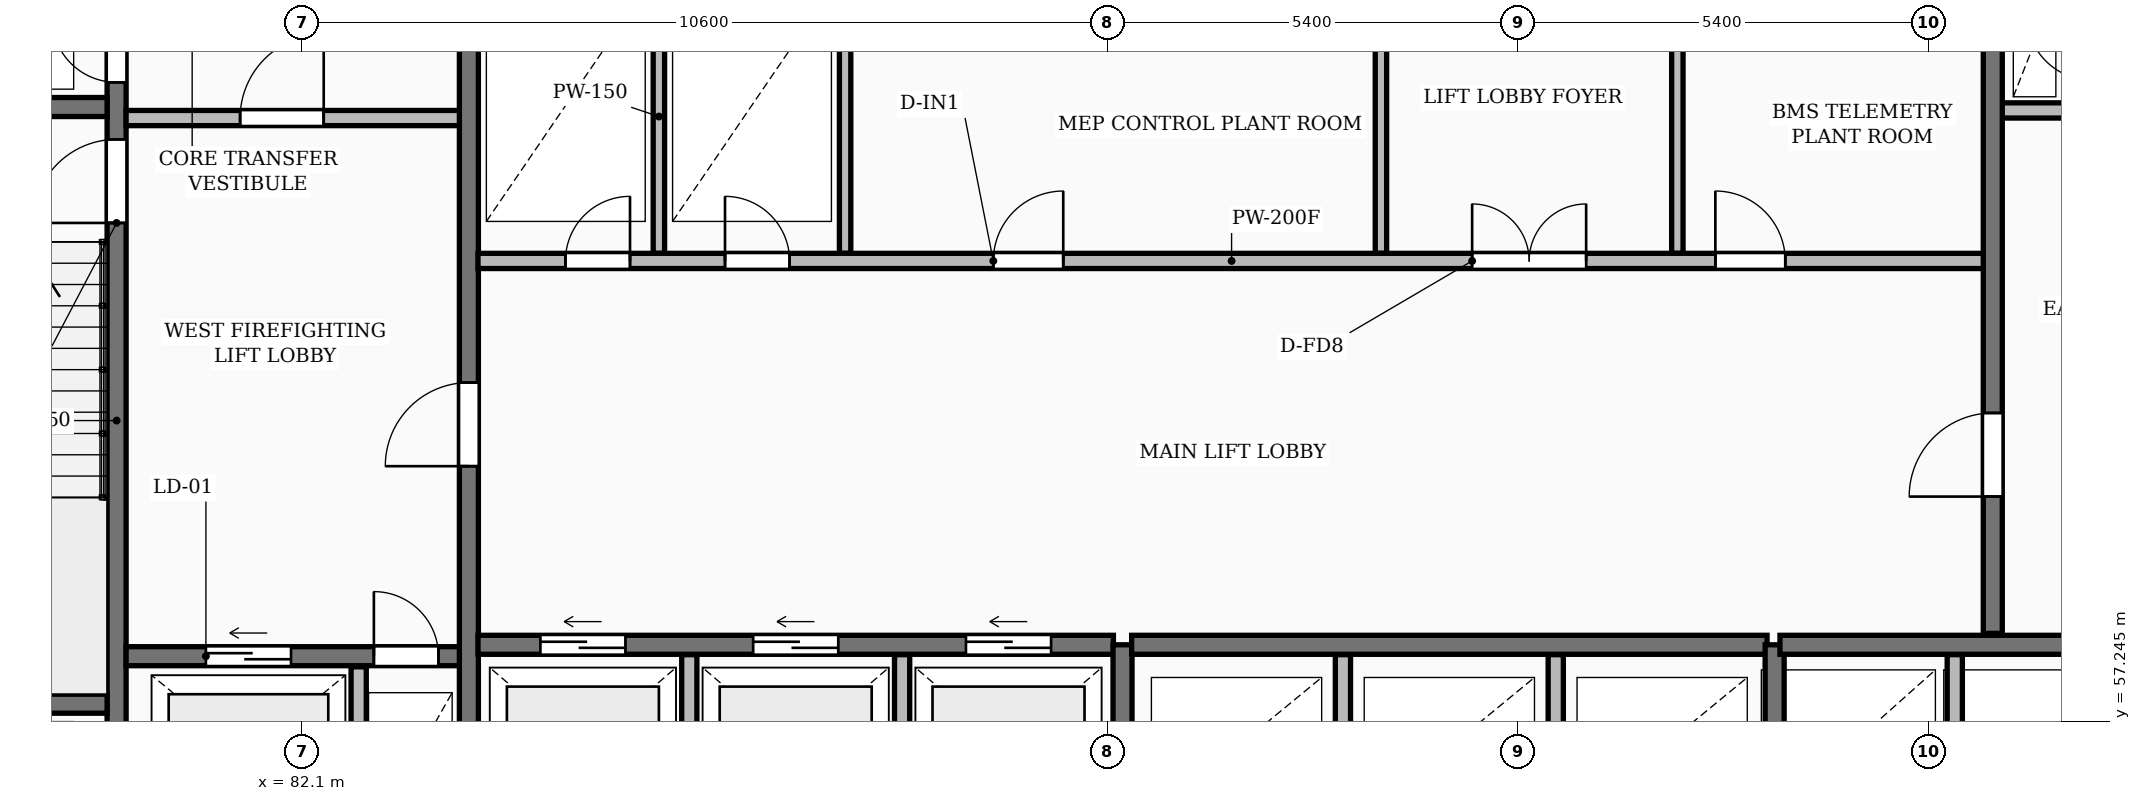
"""IFC4 building model, lengths in metres.
Left out: names, types, materials, properties, quantities, classifications, styles, units other than length and angle.
Written with IfcOpenShell. Run it as: python <this file> out.ifc"""

import sys

from ifc_helpers import new_model, si_unit, direction, frame, frame_2d, origin, place, context, subcontext, project, spatial, rectangle, extrude, element, fill, save


model = new_model("IFC4")
c1 = context("Model", 3, precision=1e-05, world=origin(), true_north=direction((0.0, 1.0)))
c2 = subcontext(c1, "Body", "Model", "MODEL_VIEW")
j1 = project(units=[si_unit("LENGTHUNIT", "METRE"), si_unit("PLANEANGLEUNIT", "RADIAN")], contexts=[c1])
p1 = place(None, origin())
s1 = spatial("IfcSite", under=j1, at=p1, CompositionType="ELEMENT")
p2 = place(p1, origin())
s2 = spatial("IfcBuilding", under=s1, at=p2, CompositionType="ELEMENT")
p3 = place(p2, frame((0.0, 0.0, 76.0)))
s3 = spatial("IfcBuildingStorey", under=s2, at=p3, CompositionType="ELEMENT", Elevation=76.0)
p4 = place(p3, frame((79.665, 55.4, 0.0), z_axis=(0.0, 0.0, 1.0), x_axis=(0.0, 1.0, 0.0)))
e1 = element("IfcWall", 1, at=p4, inside=s3, PredefinedType="SHEAR", context=c2, shape_type="SweptSolid", body=[
    extrude(rectangle(XDim=11.6, YDim=0.25, at=frame_2d((5.8, 0.0))), origin(), (0.0, 0.0, 1.0), 4.8),
])
p5 = place(p4, frame((0.55, 0.0, 0.0)))
e2 = element("IfcOpeningElement", 2, at=p5, cuts=e1, PredefinedType="OPENING", context=c2, shape_type="SweptSolid", body=[
    extrude(rectangle(XDim=0.85, YDim=2.05, at=frame_2d((0.425, 1.025))), frame((0.0, 0.135, 0.0), z_axis=(0.0, -1.0, 0.0), x_axis=(1.0, 0.0, 0.0)), (0.0, 0.0, 1.0), 0.27),
])
p6 = place(p4, frame((8.4, 0.0, 0.0)))
e3 = element("IfcOpeningElement", 3, at=p6, cuts=e1, PredefinedType="OPENING", context=c2, shape_type="SweptSolid", body=[
    extrude(rectangle(XDim=1.1, YDim=2.1, at=frame_2d((0.55, 1.05))), frame((0.0, 0.135, 0.0), z_axis=(0.0, -1.0, 0.0), x_axis=(1.0, 0.0, 0.0)), (0.0, 0.0, 1.0), 0.27),
])
p7 = place(p4, frame((10.25, 0.0, 0.0)))
e4 = element("IfcOpeningElement", 4, at=p7, cuts=e1, PredefinedType="OPENING", context=c2, shape_type="SweptSolid", body=[
    extrude(rectangle(XDim=0.85, YDim=2.05, at=frame_2d((0.425, 1.025))), frame((0.0, 0.135, 0.0), z_axis=(0.0, -1.0, 0.0), x_axis=(1.0, 0.0, 0.0)), (0.0, 0.0, 1.0), 0.27),
])
for number, where, z_axis, x_axis in (
    (5, (76.3, 57.475, 0.0), (0.0, 0.0, 1.0), (1.0, 0.0, 0.0)),
    (6, (76.3, 65.325, 0.0), (0.0, 0.0, 1.0), (1.0, 0.0, 0.0)),
):
    element("IfcWall", number, at=place(p3, frame(where, z_axis=z_axis, x_axis=x_axis)), inside=s3, PredefinedType="SHEAR", context=c2, shape_type="SweptSolid", body=[
        extrude(rectangle(XDim=3.24, YDim=0.25, at=frame_2d((1.62, 0.0))), origin(), (0.0, 0.0, 1.0), 4.8),
    ])
p8 = place(p3, frame((79.79, 58.1, 0.0), z_axis=(0.0, 0.0, 1.0), x_axis=(1.0, 0.0, 0.0)))
e7 = element("IfcWall", 7, at=p8, inside=s3, PredefinedType="SHEAR", context=c2, shape_type="SweptSolid", body=[
    extrude(rectangle(XDim=4.39, YDim=0.25, at=frame_2d((2.195, 0.0))), origin(), (0.0, 0.0, 1.0), 4.8),
])
p9 = place(p8, frame((1.05, 0.0, 0.0)))
e8 = element("IfcOpeningElement", 8, at=p9, cuts=e7, PredefinedType="OPENING", context=c2, shape_type="SweptSolid", body=[
    extrude(rectangle(XDim=1.12, YDim=2.12, at=frame_2d((0.56, 1.06))), frame((0.0, 0.135, 0.0), z_axis=(0.0, -1.0, 0.0), x_axis=(1.0, 0.0, 0.0)), (0.0, 0.0, 1.0), 0.27),
])
p10 = place(p8, frame((3.26, 0.0, 0.0)))
e9 = element("IfcOpeningElement", 9, at=p10, cuts=e7, PredefinedType="OPENING", context=c2, shape_type="SweptSolid", body=[
    extrude(rectangle(XDim=0.85, YDim=2.05, at=frame_2d((0.425, 1.025))), frame((0.0, 0.135, 0.0), z_axis=(0.0, -1.0, 0.0), x_axis=(1.0, 0.0, 0.0)), (0.0, 0.0, 1.0), 0.27),
])
p11 = place(p3, frame((82.85, 55.4, 0.0), z_axis=(0.0, 0.0, 1.0), x_axis=(0.0, 1.0, 0.0)))
e10 = element("IfcWall", 10, at=p11, inside=s3, PredefinedType="PARTITIONING", context=c2, shape_type="SweptSolid", body=[
    extrude(rectangle(XDim=2.56, YDim=0.2, at=frame_2d((1.28, 0.0))), origin(), (0.0, 0.0, 1.0), 4.48),
])
p12 = place(p3, frame((79.79, 65.18, 0.0), z_axis=(0.0, 0.0, 1.0), x_axis=(1.0, 0.0, 0.0)))
e11 = element("IfcWall", 11, at=p12, inside=s3, PredefinedType="PARTITIONING", context=c2, shape_type="SweptSolid", body=[
    extrude(rectangle(XDim=4.39, YDim=0.2, at=frame_2d((2.195, 0.0))), origin(), (0.0, 0.0, 1.0), 4.48),
])
p13 = place(p12, frame((1.5, 0.0, 0.0)))
e12 = element("IfcOpeningElement", 12, at=p13, cuts=e11, PredefinedType="OPENING", context=c2, shape_type="SweptSolid", body=[
    extrude(rectangle(XDim=1.1, YDim=2.1, at=frame_2d((0.55, 1.05))), frame((0.0, 0.11, 0.0), z_axis=(0.0, -1.0, 0.0), x_axis=(1.0, 0.0, 0.0)), (0.0, 0.0, 1.0), 0.22),
])
p14 = place(p3, frame((84.3, 55.4, 0.0), z_axis=(0.0, 0.0, 1.0), x_axis=(0.0, 1.0, 0.0)))
e13 = element("IfcWall", 13, at=p14, inside=s3, PredefinedType="SHEAR", context=c2, shape_type="SweptSolid", body=[
    extrude(rectangle(XDim=11.6, YDim=0.25, at=frame_2d((5.8, 0.0))), origin(), (0.0, 0.0, 1.0), 4.8),
])
p15 = place(p14, frame((5.2, 0.0, 0.0)))
e14 = element("IfcOpeningElement", 14, at=p15, cuts=e13, PredefinedType="OPENING", context=c2, shape_type="SweptSolid", body=[
    extrude(rectangle(XDim=1.1, YDim=2.1, at=frame_2d((0.55, 1.05))), frame((0.0, 0.135, 0.0), z_axis=(0.0, -1.0, 0.0), x_axis=(1.0, 0.0, 0.0)), (0.0, 0.0, 1.0), 0.27),
])
for number, where, z_axis, x_axis in (
    (15, (87.2, 55.4, 0.0), (0.0, 0.0, 1.0), (0.0, 1.0, 0.0)),
    (16, (90.0, 55.4, 0.0), (0.0, 0.0, 1.0), (0.0, 1.0, 0.0)),
):
    element("IfcWall", number, at=place(p3, frame(where, z_axis=z_axis, x_axis=x_axis)), inside=s3, PredefinedType="PARTITIONING", context=c2, shape_type="SweptSolid", body=[
        extrude(rectangle(XDim=2.72, YDim=0.2, at=frame_2d((1.36, 0.0))), origin(), (0.0, 0.0, 1.0), 4.48),
    ])
p16 = place(p3, frame((84.42, 58.25, 0.0), z_axis=(0.0, 0.0, 1.0), x_axis=(1.0, 0.0, 0.0)))
e17 = element("IfcWall", 17, at=p16, inside=s3, PredefinedType="SHEAR", context=c2, shape_type="SweptSolid", body=[
    extrude(rectangle(XDim=8.36, YDim=0.25, at=frame_2d((4.18, 0.0))), origin(), (0.0, 0.0, 1.0), 4.8),
])
p17 = place(p16, frame((0.82, 0.0, 0.0)))
e18 = element("IfcOpeningElement", 18, at=p17, cuts=e17, PredefinedType="OPENING", context=c2, shape_type="SweptSolid", body=[
    extrude(rectangle(XDim=1.12, YDim=2.12, at=frame_2d((0.56, 1.06))), frame((0.0, 0.135, 0.0), z_axis=(0.0, -1.0, 0.0), x_axis=(1.0, 0.0, 0.0)), (0.0, 0.0, 1.0), 0.27),
])
p18 = place(p16, frame((3.62, 0.0, 0.0)))
e19 = element("IfcOpeningElement", 19, at=p18, cuts=e17, PredefinedType="OPENING", context=c2, shape_type="SweptSolid", body=[
    extrude(rectangle(XDim=1.12, YDim=2.12, at=frame_2d((0.56, 1.06))), frame((0.0, 0.135, 0.0), z_axis=(0.0, -1.0, 0.0), x_axis=(1.0, 0.0, 0.0)), (0.0, 0.0, 1.0), 0.27),
])
p19 = place(p16, frame((6.42, 0.0, 0.0)))
e20 = element("IfcOpeningElement", 20, at=p19, cuts=e17, PredefinedType="OPENING", context=c2, shape_type="SweptSolid", body=[
    extrude(rectangle(XDim=1.12, YDim=2.12, at=frame_2d((0.56, 1.06))), frame((0.0, 0.135, 0.0), z_axis=(0.0, -1.0, 0.0), x_axis=(1.0, 0.0, 0.0)), (0.0, 0.0, 1.0), 0.27),
])
p20 = place(p3, frame((92.9, 55.4, 0.0), z_axis=(0.0, 0.0, 1.0), x_axis=(0.0, 1.0, 0.0)))
e21 = element("IfcWall", 21, at=p20, inside=s3, PredefinedType="SHEAR", context=c2, shape_type="SweptSolid", body=[
    extrude(rectangle(XDim=2.85, YDim=0.25, at=frame_2d((1.425, 0.0))), origin(), (0.0, 0.0, 1.0), 4.8),
])
for number, where, z_axis, x_axis in (
    (22, (95.8, 55.4, 0.0), (0.0, 0.0, 1.0), (0.0, 1.0, 0.0)),
    (23, (98.6, 55.4, 0.0), (0.0, 0.0, 1.0), (0.0, 1.0, 0.0)),
):
    element("IfcWall", number, at=place(p3, frame(where, z_axis=z_axis, x_axis=x_axis)), inside=s3, PredefinedType="PARTITIONING", context=c2, shape_type="SweptSolid", body=[
        extrude(rectangle(XDim=2.72, YDim=0.2, at=frame_2d((1.36, 0.0))), origin(), (0.0, 0.0, 1.0), 4.48),
    ])
p21 = place(p3, frame((93.02, 58.25, 0.0), z_axis=(0.0, 0.0, 1.0), x_axis=(1.0, 0.0, 0.0)))
e24 = element("IfcWall", 24, at=p21, inside=s3, PredefinedType="SHEAR", context=c2, shape_type="SweptSolid", body=[
    extrude(rectangle(XDim=8.36, YDim=0.25, at=frame_2d((4.18, 0.0))), origin(), (0.0, 0.0, 1.0), 4.8),
])
p22 = place(p3, frame((101.48, 55.4, 0.0), z_axis=(0.0, 0.0, 1.0), x_axis=(0.0, 1.0, 0.0)))
e25 = element("IfcWall", 25, at=p22, inside=s3, PredefinedType="SHEAR", context=c2, shape_type="SweptSolid", body=[
    extrude(rectangle(XDim=2.85, YDim=0.25, at=frame_2d((1.425, 0.0))), origin(), (0.0, 0.0, 1.0), 4.8),
])
p23 = place(p3, frame((103.85, 55.4, 0.0), z_axis=(0.0, 0.0, 1.0), x_axis=(0.0, 1.0, 0.0)))
e26 = element("IfcWall", 26, at=p23, inside=s3, PredefinedType="PARTITIONING", context=c2, shape_type="SweptSolid", body=[
    extrude(rectangle(XDim=2.72, YDim=0.2, at=frame_2d((1.36, 0.0))), origin(), (0.0, 0.0, 1.0), 4.48),
])
p24 = place(p3, frame((101.55, 58.25, 0.0), z_axis=(0.0, 0.0, 1.0), x_axis=(1.0, 0.0, 0.0)))
e27 = element("IfcWall", 27, at=p24, inside=s3, PredefinedType="SHEAR", context=c2, shape_type="SweptSolid", body=[
    extrude(rectangle(XDim=4.6, YDim=0.25, at=frame_2d((2.3, 0.0))), origin(), (0.0, 0.0, 1.0), 4.8),
])
for number, where, z_axis, x_axis in (
    (28, (86.8, 63.4, 0.0), (0.0, 0.0, 1.0), (0.0, 1.0, 0.0)),
    (29, (89.25, 63.4, 0.0), (0.0, 0.0, 1.0), (0.0, 1.0, 0.0)),
    (30, (96.3, 63.4, 0.0), (0.0, 0.0, 1.0), (0.0, 1.0, 0.0)),
    (31, (100.2, 63.4, 0.0), (0.0, 0.0, 1.0), (0.0, 1.0, 0.0)),
):
    element("IfcWall", number, at=place(p3, frame(where, z_axis=z_axis, x_axis=x_axis)), inside=s3, PredefinedType="PARTITIONING", context=c2, shape_type="SweptSolid", body=[
        extrude(rectangle(XDim=3.6, YDim=0.15, at=frame_2d((1.8, 0.0))), origin(), (0.0, 0.0, 1.0), 4.48),
    ])
p25 = place(p3, frame((84.42, 63.3, 0.0), z_axis=(0.0, 0.0, 1.0), x_axis=(1.0, 0.0, 0.0)))
e32 = element("IfcWall", 32, at=p25, inside=s3, PredefinedType="PARTITIONING", context=c2, shape_type="SweptSolid", body=[
    extrude(rectangle(XDim=19.83, YDim=0.2, at=frame_2d((9.915, 0.0))), origin(), (0.0, 0.0, 1.0), 4.48),
])
p26 = place(p25, frame((1.15, 0.0, 0.0)))
e33 = element("IfcOpeningElement", 33, at=p26, cuts=e32, PredefinedType="OPENING", context=c2, shape_type="SweptSolid", body=[
    extrude(rectangle(XDim=0.85, YDim=2.05, at=frame_2d((0.425, 1.025))), frame((0.0, 0.11, 0.0), z_axis=(0.0, -1.0, 0.0), x_axis=(1.0, 0.0, 0.0)), (0.0, 0.0, 1.0), 0.22),
])
p27 = place(p25, frame((3.25, 0.0, 0.0)))
e34 = element("IfcOpeningElement", 34, at=p27, cuts=e32, PredefinedType="OPENING", context=c2, shape_type="SweptSolid", body=[
    extrude(rectangle(XDim=0.85, YDim=2.05, at=frame_2d((0.425, 1.025))), frame((0.0, 0.11, 0.0), z_axis=(0.0, -1.0, 0.0), x_axis=(1.0, 0.0, 0.0)), (0.0, 0.0, 1.0), 0.22),
])
p28 = place(p25, frame((13.08, 0.0, 0.0)))
e35 = element("IfcOpeningElement", 35, at=p28, cuts=e32, PredefinedType="OPENING", context=c2, shape_type="SweptSolid", body=[
    extrude(rectangle(XDim=1.5, YDim=2.2, at=frame_2d((0.75, 1.1))), frame((0.0, 0.11, 0.0), z_axis=(0.0, -1.0, 0.0), x_axis=(1.0, 0.0, 0.0)), (0.0, 0.0, 1.0), 0.22),
])
p29 = place(p25, frame((6.78, 0.0, 0.0)))
e36 = element("IfcOpeningElement", 36, at=p29, cuts=e32, PredefinedType="OPENING", context=c2, shape_type="SweptSolid", body=[
    extrude(rectangle(XDim=0.92, YDim=2.08, at=frame_2d((0.46, 1.04))), frame((0.0, 0.11, 0.0), z_axis=(0.0, -1.0, 0.0), x_axis=(1.0, 0.0, 0.0)), (0.0, 0.0, 1.0), 0.22),
])
p30 = place(p25, frame((16.28, 0.0, 0.0)))
e37 = element("IfcOpeningElement", 37, at=p30, cuts=e32, PredefinedType="OPENING", context=c2, shape_type="SweptSolid", body=[
    extrude(rectangle(XDim=0.92, YDim=2.08, at=frame_2d((0.46, 1.04))), frame((0.0, 0.11, 0.0), z_axis=(0.0, -1.0, 0.0), x_axis=(1.0, 0.0, 0.0)), (0.0, 0.0, 1.0), 0.22),
])
p31 = place(p3, frame((104.45, 65.28, 0.0), z_axis=(0.0, 0.0, 1.0), x_axis=(1.0, 0.0, 0.0)))
e38 = element("IfcWall", 38, at=p31, inside=s3, PredefinedType="PARTITIONING", context=c2, shape_type="SweptSolid", body=[
    extrude(rectangle(XDim=1.2, YDim=0.2, at=frame_2d((0.6, 0.0))), origin(), (0.0, 0.0, 1.0), 4.48),
])
p32 = place(p3, frame((104.35, 58.4, 0.0), z_axis=(0.0, 0.0, 1.0), x_axis=(0.0, 1.0, 0.0)))
e39 = element("IfcWall", 39, at=p32, inside=s3, PredefinedType="SHEAR", context=c2, shape_type="SweptSolid", body=[
    extrude(rectangle(XDim=8.6, YDim=0.25, at=frame_2d((4.3, 0.0))), origin(), (0.0, 0.0, 1.0), 4.8),
])
p33 = place(p32, frame((1.8, 0.0, 0.0)))
e40 = element("IfcOpeningElement", 40, at=p33, cuts=e39, PredefinedType="OPENING", context=c2, shape_type="SweptSolid", body=[
    extrude(rectangle(XDim=1.1, YDim=2.1, at=frame_2d((0.55, 1.05))), frame((0.0, 0.135, 0.0), z_axis=(0.0, -1.0, 0.0), x_axis=(1.0, 0.0, 0.0)), (0.0, 0.0, 1.0), 0.27),
])
p34 = place(p6, origin())
e41 = element("IfcDoor", 41, at=p34, inside=s3, OperationType="SINGLE_SWING_LEFT", PredefinedType="DOOR", context=c2, shape_type="SweptSolid", body=[
    extrude(rectangle(XDim=1.1, YDim=2.1, at=frame_2d((0.55, 1.05))), frame((0.0, 0.025, 0.0), z_axis=(0.0, -1.0, 0.0), x_axis=(1.0, 0.0, 0.0)), (0.0, 0.0, 1.0), 0.05),
])
fill(e3, e41)
p35 = place(p7, origin())
e42 = element("IfcDoor", 42, at=p35, inside=s3, OperationType="SINGLE_SWING_RIGHT", PredefinedType="DOOR", context=c2, shape_type="SweptSolid", body=[
    extrude(rectangle(XDim=0.85, YDim=2.05, at=frame_2d((0.425, 1.025))), frame((0.0, 0.025, 0.0), z_axis=(0.0, -1.0, 0.0), x_axis=(1.0, 0.0, 0.0)), (0.0, 0.0, 1.0), 0.05),
])
fill(e4, e42)
p36 = place(p9, origin())
e43 = element("IfcDoor", 43, at=p36, inside=s3, OperationType="SLIDING_TO_LEFT", PredefinedType="DOOR", context=c2, shape_type="SweptSolid", body=[
    extrude(rectangle(XDim=1.12, YDim=2.12, at=frame_2d((0.56, 1.06))), frame((0.0, 0.025, 0.0), z_axis=(0.0, -1.0, 0.0), x_axis=(1.0, 0.0, 0.0)), (0.0, 0.0, 1.0), 0.05),
])
fill(e8, e43)
p37 = place(p10, origin())
e44 = element("IfcDoor", 44, at=p37, inside=s3, OperationType="SINGLE_SWING_LEFT", PredefinedType="DOOR", context=c2, shape_type="SweptSolid", body=[
    extrude(rectangle(XDim=0.85, YDim=2.05, at=frame_2d((0.425, 1.025))), frame((0.0, 0.025, 0.0), z_axis=(0.0, -1.0, 0.0), x_axis=(1.0, 0.0, 0.0)), (0.0, 0.0, 1.0), 0.05),
])
fill(e9, e44)
p38 = place(p13, origin())
e45 = element("IfcDoor", 45, at=p38, inside=s3, OperationType="SINGLE_SWING_RIGHT", PredefinedType="DOOR", context=c2, shape_type="SweptSolid", body=[
    extrude(rectangle(XDim=1.1, YDim=2.1, at=frame_2d((0.55, 1.05))), frame((0.0, 0.025, 0.0), z_axis=(0.0, -1.0, 0.0), x_axis=(1.0, 0.0, 0.0)), (0.0, 0.0, 1.0), 0.05),
])
fill(e12, e45)
p39 = place(p15, origin())
e46 = element("IfcDoor", 46, at=p39, inside=s3, OperationType="SINGLE_SWING_LEFT", PredefinedType="DOOR", context=c2, shape_type="SweptSolid", body=[
    extrude(rectangle(XDim=1.1, YDim=2.1, at=frame_2d((0.55, 1.05))), frame((0.0, 0.025, 0.0), z_axis=(0.0, -1.0, 0.0), x_axis=(1.0, 0.0, 0.0)), (0.0, 0.0, 1.0), 0.05),
])
fill(e14, e46)
p40 = place(p17, origin())
e47 = element("IfcDoor", 47, at=p40, inside=s3, OperationType="SLIDING_TO_LEFT", PredefinedType="DOOR", context=c2, shape_type="SweptSolid", body=[
    extrude(rectangle(XDim=1.12, YDim=2.12, at=frame_2d((0.56, 1.06))), frame((0.0, 0.025, 0.0), z_axis=(0.0, -1.0, 0.0), x_axis=(1.0, 0.0, 0.0)), (0.0, 0.0, 1.0), 0.05),
])
fill(e18, e47)
p41 = place(p18, origin())
e48 = element("IfcDoor", 48, at=p41, inside=s3, OperationType="SLIDING_TO_LEFT", PredefinedType="DOOR", context=c2, shape_type="SweptSolid", body=[
    extrude(rectangle(XDim=1.12, YDim=2.12, at=frame_2d((0.56, 1.06))), frame((0.0, 0.025, 0.0), z_axis=(0.0, -1.0, 0.0), x_axis=(1.0, 0.0, 0.0)), (0.0, 0.0, 1.0), 0.05),
])
fill(e19, e48)
p42 = place(p19, origin())
e49 = element("IfcDoor", 49, at=p42, inside=s3, OperationType="SLIDING_TO_LEFT", PredefinedType="DOOR", context=c2, shape_type="SweptSolid", body=[
    extrude(rectangle(XDim=1.12, YDim=2.12, at=frame_2d((0.56, 1.06))), frame((0.0, 0.025, 0.0), z_axis=(0.0, -1.0, 0.0), x_axis=(1.0, 0.0, 0.0)), (0.0, 0.0, 1.0), 0.05),
])
fill(e20, e49)
p43 = place(p26, origin())
e50 = element("IfcDoor", 50, at=p43, inside=s3, OperationType="SINGLE_SWING_RIGHT", PredefinedType="DOOR", context=c2, shape_type="SweptSolid", body=[
    extrude(rectangle(XDim=0.85, YDim=2.05, at=frame_2d((0.425, 1.025))), frame((0.0, 0.025, 0.0), z_axis=(0.0, -1.0, 0.0), x_axis=(1.0, 0.0, 0.0)), (0.0, 0.0, 1.0), 0.05),
])
fill(e33, e50)
p44 = place(p27, origin())
e51 = element("IfcDoor", 51, at=p44, inside=s3, OperationType="SINGLE_SWING_LEFT", PredefinedType="DOOR", context=c2, shape_type="SweptSolid", body=[
    extrude(rectangle(XDim=0.85, YDim=2.05, at=frame_2d((0.425, 1.025))), frame((0.0, 0.025, 0.0), z_axis=(0.0, -1.0, 0.0), x_axis=(1.0, 0.0, 0.0)), (0.0, 0.0, 1.0), 0.05),
])
fill(e34, e51)
p45 = place(p28, origin())
e52 = element("IfcDoor", 52, at=p45, inside=s3, OperationType="DOUBLE_DOOR_SINGLE_SWING", PredefinedType="DOOR", context=c2, shape_type="SweptSolid", body=[
    extrude(rectangle(XDim=1.5, YDim=2.2, at=frame_2d((0.75, 1.1))), frame((0.0, 0.025, 0.0), z_axis=(0.0, -1.0, 0.0), x_axis=(1.0, 0.0, 0.0)), (0.0, 0.0, 1.0), 0.05),
])
fill(e35, e52)
p46 = place(p29, origin())
e53 = element("IfcDoor", 53, at=p46, inside=s3, OperationType="SINGLE_SWING_RIGHT", PredefinedType="DOOR", context=c2, shape_type="SweptSolid", body=[
    extrude(rectangle(XDim=0.92, YDim=2.08, at=frame_2d((0.46, 1.04))), frame((0.0, 0.025, 0.0), z_axis=(0.0, -1.0, 0.0), x_axis=(1.0, 0.0, 0.0)), (0.0, 0.0, 1.0), 0.05),
])
fill(e36, e53)
p47 = place(p30, origin())
e54 = element("IfcDoor", 54, at=p47, inside=s3, OperationType="SINGLE_SWING_LEFT", PredefinedType="DOOR", context=c2, shape_type="SweptSolid", body=[
    extrude(rectangle(XDim=0.92, YDim=2.08, at=frame_2d((0.46, 1.04))), frame((0.0, 0.025, 0.0), z_axis=(0.0, -1.0, 0.0), x_axis=(1.0, 0.0, 0.0)), (0.0, 0.0, 1.0), 0.05),
])
fill(e37, e54)
p48 = place(p33, origin())
e55 = element("IfcDoor", 55, at=p48, inside=s3, OperationType="SINGLE_SWING_LEFT", PredefinedType="DOOR", context=c2, shape_type="SweptSolid", body=[
    extrude(rectangle(XDim=1.1, YDim=2.1, at=frame_2d((0.55, 1.05))), frame((0.0, 0.025, 0.0), z_axis=(0.0, -1.0, 0.0), x_axis=(1.0, 0.0, 0.0)), (0.0, 0.0, 1.0), 0.05),
])
fill(e40, e55)
save(model, sys.argv[1])
